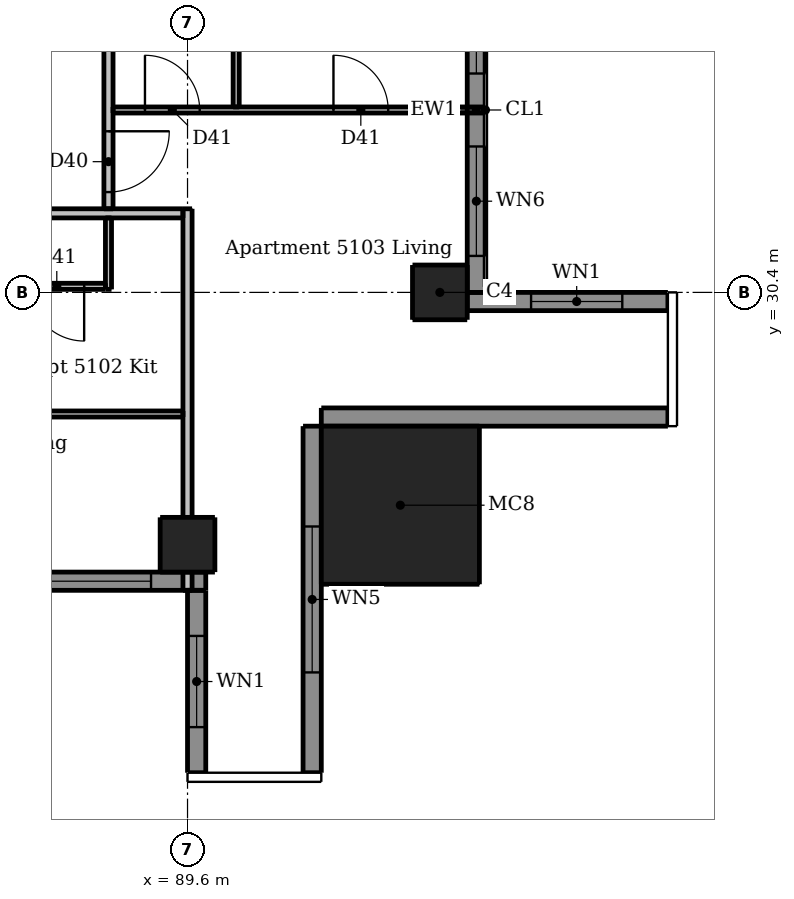
"""IFC4 building model, lengths in metres.
Left out: names, types, materials, properties, quantities, classifications, styles, units other than length and angle.
Written with IfcOpenShell. Run it as: python <this file> out.ifc"""

import sys

from ifc_helpers import new_model, si_unit, direction, frame, frame_2d, origin, origin_2d, place, context, subcontext, project, spatial, rectangle, extrude, element, fill, save


model = new_model("IFC4")
c1 = context("Model", 3, precision=1e-05, world=origin(), true_north=direction((0.0, 1.0)))
c2 = subcontext(c1, "Body", "Model", "MODEL_VIEW")
j1 = project(units=[si_unit("LENGTHUNIT", "METRE"), si_unit("PLANEANGLEUNIT", "RADIAN")], contexts=[c1])
p1 = place(None, origin())
s1 = spatial("IfcSite", under=j1, at=p1, CompositionType="ELEMENT")
p2 = place(p1, origin())
s2 = spatial("IfcBuilding", under=s1, at=p2, CompositionType="ELEMENT")
p3 = place(p2, frame((0.0, 0.0, 193.6)))
s3 = spatial("IfcBuildingStorey", under=s2, at=p3, CompositionType="ELEMENT", Elevation=193.6)
for number, where, z_axis, x_axis in (
    (1, (89.6, 26.25, 0.0), (0.0, 0.0, 1.0), (1.0, 0.0, 0.0)),
    (2, (93.75, 30.4, 0.0), (0.0, 0.0, 1.0), (1.0, 0.0, 0.0)),
):
    element("IfcColumn", number, at=place(p3, frame(where, z_axis=z_axis, x_axis=x_axis)), inside=s3, PredefinedType="COLUMN", context=c2, shape_type="SweptSolid", body=[
        extrude(rectangle(XDim=0.9, YDim=0.9, at=origin_2d()), origin(), (0.0, 0.0, 1.0), 3.05),
    ])
p4 = place(p3, frame((93.1, 26.9, 0.0), z_axis=(0.0, 0.0, 1.0), x_axis=(1.0, 0.0, 0.0)))
e3 = element("IfcColumn", 3, at=p4, inside=s3, PredefinedType="COLUMN", context=c2, shape_type="SweptSolid", body=[
    extrude(rectangle(XDim=2.6, YDim=2.6, at=origin_2d()), origin(), (0.0, 0.0, 1.0), 3.3),
])
p5 = place(p3, frame((89.75, 25.5, 0.0), z_axis=(0.0, 0.0, 1.0), x_axis=(0.0, -1.0, 0.0)))
e4 = element("IfcWall", 4, at=p5, inside=s3, PredefinedType="SOLIDWALL", context=c2, shape_type="SweptSolid", body=[
    extrude(rectangle(XDim=3.0, YDim=0.3, at=frame_2d((1.5, 0.0))), origin(), (0.0, 0.0, 1.0), 3.05),
])
p6 = place(p5, frame((0.75, 0.0, 0.9)))
e5 = element("IfcOpeningElement", 5, at=p6, cuts=e4, PredefinedType="OPENING", context=c2, shape_type="SweptSolid", body=[
    extrude(rectangle(XDim=1.5, YDim=1.5, at=frame_2d((0.75, 0.75))), frame((0.0, 0.16, 0.0), z_axis=(0.0, -1.0, 0.0), x_axis=(1.0, 0.0, 0.0)), (0.0, 0.0, 1.0), 0.32),
])
p7 = place(p3, frame((91.65, 22.5, 0.0), z_axis=(0.0, 0.0, 1.0), x_axis=(0.0, 1.0, 0.0)))
e6 = element("IfcWall", 6, at=p7, inside=s3, PredefinedType="SOLIDWALL", context=c2, shape_type="SweptSolid", body=[
    extrude(rectangle(XDim=5.7, YDim=0.3, at=frame_2d((2.85, 0.0))), origin(), (0.0, 0.0, 1.0), 3.05),
])
p8 = place(p7, frame((1.65, 0.0, 0.15)))
e7 = element("IfcOpeningElement", 7, at=p8, cuts=e6, PredefinedType="OPENING", context=c2, shape_type="SweptSolid", body=[
    extrude(rectangle(XDim=2.4, YDim=2.1, at=frame_2d((1.2, 1.05))), frame((0.0, 0.16, 0.0), z_axis=(0.0, -1.0, 0.0), x_axis=(1.0, 0.0, 0.0)), (0.0, 0.0, 1.0), 0.32),
])
p9 = place(p3, frame((91.8, 28.35, 0.0), z_axis=(0.0, 0.0, 1.0), x_axis=(1.0, 0.0, 0.0)))
e8 = element("IfcWall", 8, at=p9, inside=s3, PredefinedType="SOLIDWALL", context=c2, shape_type="SweptSolid", body=[
    extrude(rectangle(XDim=5.7, YDim=0.3, at=frame_2d((2.85, 0.0))), origin(), (0.0, 0.0, 1.0), 3.05),
])
p10 = place(p3, frame((97.5, 30.25, 0.0), z_axis=(0.0, 0.0, 1.0), x_axis=(-1.0, 0.0, 0.0)))
e9 = element("IfcWall", 9, at=p10, inside=s3, PredefinedType="SOLIDWALL", context=c2, shape_type="SweptSolid", body=[
    extrude(rectangle(XDim=3.3, YDim=0.3, at=frame_2d((1.65, 0.0))), origin(), (0.0, 0.0, 1.0), 3.05),
])
p11 = place(p10, frame((0.75, 0.0, 0.9)))
e10 = element("IfcOpeningElement", 10, at=p11, cuts=e9, PredefinedType="OPENING", context=c2, shape_type="SweptSolid", body=[
    extrude(rectangle(XDim=1.5, YDim=1.5, at=frame_2d((0.75, 0.75))), frame((0.0, 0.16, 0.0), z_axis=(0.0, -1.0, 0.0), x_axis=(1.0, 0.0, 0.0)), (0.0, 0.0, 1.0), 0.32),
])
p12 = place(p3, frame((83.6, 25.65, 0.0), z_axis=(0.0, 0.0, 1.0), x_axis=(1.0, 0.0, 0.0)))
e11 = element("IfcWall", 11, at=p12, inside=s3, PredefinedType="SOLIDWALL", context=c2, shape_type="SweptSolid", body=[
    extrude(rectangle(XDim=6.3, YDim=0.3, at=frame_2d((3.15, 0.0))), origin(), (0.0, 0.0, 1.0), 3.05),
])
p13 = place(p12, frame((0.6, 0.0, 0.15)))
e12 = element("IfcOpeningElement", 12, at=p13, cuts=e11, PredefinedType="OPENING", context=c2, shape_type="SweptSolid", body=[
    extrude(rectangle(XDim=1.8, YDim=2.1, at=frame_2d((0.9, 1.05))), frame((0.0, 0.16, 0.0), z_axis=(0.0, -1.0, 0.0), x_axis=(1.0, 0.0, 0.0)), (0.0, 0.0, 1.0), 0.32),
])
p14 = place(p12, frame((3.6, 0.0, 0.15)))
e13 = element("IfcOpeningElement", 13, at=p14, cuts=e11, PredefinedType="OPENING", context=c2, shape_type="SweptSolid", body=[
    extrude(rectangle(XDim=1.8, YDim=2.1, at=frame_2d((0.9, 1.05))), frame((0.0, 0.16, 0.0), z_axis=(0.0, -1.0, 0.0), x_axis=(1.0, 0.0, 0.0)), (0.0, 0.0, 1.0), 0.32),
])
p15 = place(p3, frame((94.35, 30.4, 0.0), z_axis=(0.0, 0.0, 1.0), x_axis=(0.0, 1.0, 0.0)))
e14 = element("IfcWall", 14, at=p15, inside=s3, PredefinedType="SOLIDWALL", context=c2, shape_type="SweptSolid", body=[
    extrude(rectangle(XDim=6.0, YDim=0.3, at=frame_2d((3.0, 0.0))), origin(), (0.0, 0.0, 1.0), 3.05),
])
p16 = place(p15, frame((0.6, 0.0, 0.15)))
e15 = element("IfcOpeningElement", 15, at=p16, cuts=e14, PredefinedType="OPENING", context=c2, shape_type="SweptSolid", body=[
    extrude(rectangle(XDim=1.8, YDim=2.1, at=frame_2d((0.9, 1.05))), frame((0.0, 0.16, 0.0), z_axis=(0.0, -1.0, 0.0), x_axis=(1.0, 0.0, 0.0)), (0.0, 0.0, 1.0), 0.32),
])
p17 = place(p15, frame((3.6, 0.0, 0.15)))
e16 = element("IfcOpeningElement", 16, at=p17, cuts=e14, PredefinedType="OPENING", context=c2, shape_type="SweptSolid", body=[
    extrude(rectangle(XDim=1.8, YDim=2.1, at=frame_2d((0.9, 1.05))), frame((0.0, 0.16, 0.0), z_axis=(0.0, -1.0, 0.0), x_axis=(1.0, 0.0, 0.0)), (0.0, 0.0, 1.0), 0.32),
])
p18 = place(p3, frame((88.3, 30.45, 0.0), z_axis=(0.0, 0.0, 1.0), x_axis=(0.0, 1.0, 0.0)))
e17 = element("IfcWall", 17, at=p18, inside=s3, PredefinedType="PARTITIONING", context=c2, shape_type="SweptSolid", body=[
    extrude(rectangle(XDim=1.175, YDim=0.1, at=frame_2d((0.587, 0.0))), origin(), (0.0, 0.0, 1.0), 3.05),
])
p19 = place(p3, frame((90.4, 33.45, 0.0), z_axis=(0.0, 0.0, 1.0), x_axis=(0.0, 1.0, 0.0)))
e18 = element("IfcWall", 18, at=p19, inside=s3, PredefinedType="PARTITIONING", context=c2, shape_type="SweptSolid", body=[
    extrude(rectangle(XDim=5.975, YDim=0.1, at=frame_2d((2.988, 0.0))), origin(), (0.0, 0.0, 1.0), 3.05),
])
p20 = place(p19, frame((3.8, 0.0, 0.0)))
e19 = element("IfcOpeningElement", 19, at=p20, cuts=e18, PredefinedType="OPENING", context=c2, shape_type="SweptSolid", body=[
    extrude(rectangle(XDim=0.8, YDim=2.1, at=frame_2d((0.4, 1.05))), frame((0.0, 0.06, 0.0), z_axis=(0.0, -1.0, 0.0), x_axis=(1.0, 0.0, 0.0)), (0.0, 0.0, 1.0), 0.12),
])
p21 = place(p3, frame((88.375, 33.4, 0.0), z_axis=(0.0, 0.0, 1.0), x_axis=(1.0, 0.0, 0.0)))
e20 = element("IfcWall", 20, at=p21, inside=s3, PredefinedType="PARTITIONING", context=c2, shape_type="SweptSolid", body=[
    extrude(rectangle(XDim=6.125, YDim=0.1, at=frame_2d((3.062, 0.0))), origin(), (0.0, 0.0, 1.0), 3.05),
])
p22 = place(p21, frame((0.525, 0.0, 0.0)))
e21 = element("IfcOpeningElement", 21, at=p22, cuts=e20, PredefinedType="OPENING", context=c2, shape_type="SweptSolid", body=[
    extrude(rectangle(XDim=0.9, YDim=2.1, at=frame_2d((0.45, 1.05))), frame((0.0, 0.06, 0.0), z_axis=(0.0, -1.0, 0.0), x_axis=(1.0, 0.0, 0.0)), (0.0, 0.0, 1.0), 0.12),
])
p23 = place(p21, frame((3.625, 0.0, 0.0)))
e22 = element("IfcOpeningElement", 22, at=p23, cuts=e20, PredefinedType="OPENING", context=c2, shape_type="SweptSolid", body=[
    extrude(rectangle(XDim=0.9, YDim=2.1, at=frame_2d((0.45, 1.05))), frame((0.0, 0.06, 0.0), z_axis=(0.0, -1.0, 0.0), x_axis=(1.0, 0.0, 0.0)), (0.0, 0.0, 1.0), 0.12),
])
p24 = place(p3, frame((88.25, 30.5, 0.0), z_axis=(0.0, 0.0, 1.0), x_axis=(-1.0, 0.0, 0.0)))
e23 = element("IfcWall", 23, at=p24, inside=s3, PredefinedType="PARTITIONING", context=c2, shape_type="SweptSolid", body=[
    extrude(rectangle(XDim=16.575, YDim=0.1, at=frame_2d((8.288, 0.0))), origin(), (0.0, 0.0, 1.0), 3.05),
])
p25 = place(p24, frame((4.15, 0.0, 0.0)))
e24 = element("IfcOpeningElement", 24, at=p25, cuts=e23, PredefinedType="OPENING", context=c2, shape_type="SweptSolid", body=[
    extrude(rectangle(XDim=0.9, YDim=2.1, at=frame_2d((0.45, 1.05))), frame((0.0, 0.06, 0.0), z_axis=(0.0, -1.0, 0.0), x_axis=(1.0, 0.0, 0.0)), (0.0, 0.0, 1.0), 0.12),
])
p26 = place(p24, frame((0.35, 0.0, 0.0)))
e25 = element("IfcOpeningElement", 25, at=p26, cuts=e23, PredefinedType="OPENING", context=c2, shape_type="SweptSolid", body=[
    extrude(rectangle(XDim=0.9, YDim=2.1, at=frame_2d((0.45, 1.05))), frame((0.0, 0.06, 0.0), z_axis=(0.0, -1.0, 0.0), x_axis=(1.0, 0.0, 0.0)), (0.0, 0.0, 1.0), 0.12),
])
p27 = place(p24, frame((14.4, 0.0, 0.0)))
e26 = element("IfcOpeningElement", 26, at=p27, cuts=e23, PredefinedType="OPENING", context=c2, shape_type="SweptSolid", body=[
    extrude(rectangle(XDim=0.9, YDim=2.1, at=frame_2d((0.45, 1.05))), frame((0.0, 0.06, 0.0), z_axis=(0.0, -1.0, 0.0), x_axis=(1.0, 0.0, 0.0)), (0.0, 0.0, 1.0), 0.12),
])
p28 = place(p24, frame((8.65, 0.0, 0.0)))
e27 = element("IfcOpeningElement", 27, at=p28, cuts=e23, PredefinedType="OPENING", context=c2, shape_type="SweptSolid", body=[
    extrude(rectangle(XDim=0.9, YDim=2.1, at=frame_2d((0.45, 1.05))), frame((0.0, 0.06, 0.0), z_axis=(0.0, -1.0, 0.0), x_axis=(1.0, 0.0, 0.0)), (0.0, 0.0, 1.0), 0.12),
])
p29 = place(p24, frame((11.45, 0.0, 0.0)))
e28 = element("IfcOpeningElement", 28, at=p29, cuts=e23, PredefinedType="OPENING", context=c2, shape_type="SweptSolid", body=[
    extrude(rectangle(XDim=0.8, YDim=2.1, at=frame_2d((0.4, 1.05))), frame((0.0, 0.06, 0.0), z_axis=(0.0, -1.0, 0.0), x_axis=(1.0, 0.0, 0.0)), (0.0, 0.0, 1.0), 0.12),
])
p30 = place(p3, frame((86.65, 28.4, 0.0), z_axis=(0.0, 0.0, 1.0), x_axis=(1.0, 0.0, 0.0)))
e29 = element("IfcWall", 29, at=p30, inside=s3, PredefinedType="PARTITIONING", context=c2, shape_type="SweptSolid", body=[
    extrude(rectangle(XDim=2.875, YDim=0.1, at=frame_2d((1.438, 0.0))), origin(), (0.0, 0.0, 1.0), 3.05),
])
p31 = place(p3, frame((88.3, 61.175, 0.0), z_axis=(0.0, 0.0, 1.0), x_axis=(0.0, -1.0, 0.0)))
e30 = element("IfcWall", 30, at=p31, inside=s3, PredefinedType="PARTITIONING", context=c2, shape_type="SweptSolid", body=[
    extrude(rectangle(XDim=29.4, YDim=0.15, at=frame_2d((14.7, 0.0))), origin(), (0.0, 0.0, 1.0), 3.05),
])
p32 = place(p31, frame((28.125, 0.0, 0.0)))
e31 = element("IfcOpeningElement", 31, at=p32, cuts=e30, PredefinedType="OPENING", context=c2, shape_type="SweptSolid", body=[
    extrude(rectangle(XDim=1.0, YDim=2.1, at=frame_2d((0.5, 1.05))), frame((0.0, 0.085, 0.0), z_axis=(0.0, -1.0, 0.0), x_axis=(1.0, 0.0, 0.0)), (0.0, 0.0, 1.0), 0.17),
])
p33 = place(p31, frame((10.725, 0.0, 0.0)))
e32 = element("IfcOpeningElement", 32, at=p33, cuts=e30, PredefinedType="OPENING", context=c2, shape_type="SweptSolid", body=[
    extrude(rectangle(XDim=1.0, YDim=2.1, at=frame_2d((0.5, 1.05))), frame((0.0, 0.085, 0.0), z_axis=(0.0, -1.0, 0.0), x_axis=(1.0, 0.0, 0.0)), (0.0, 0.0, 1.0), 0.17),
])
p34 = place(p3, frame((89.6, 25.5, 0.0), z_axis=(0.0, 0.0, 1.0), x_axis=(0.0, 1.0, 0.0)))
e33 = element("IfcWall", 33, at=p34, inside=s3, PredefinedType="PARTITIONING", context=c2, shape_type="SweptSolid", body=[
    extrude(rectangle(XDim=6.275, YDim=0.15, at=frame_2d((3.137, 0.0))), origin(), (0.0, 0.0, 1.0), 2.516),
])
p35 = place(p3, frame((89.525, 31.7, 0.0), z_axis=(0.0, 0.0, 1.0), x_axis=(-1.0, 0.0, 0.0)))
e34 = element("IfcWall", 34, at=p35, inside=s3, PredefinedType="PARTITIONING", context=c2, shape_type="SweptSolid", body=[
    extrude(rectangle(XDim=30.55, YDim=0.15, at=frame_2d((15.275, 0.0))), origin(), (0.0, 0.0, 1.0), 3.05),
])
p36 = place(p35, frame((26.775, 0.0, 0.0)))
e35 = element("IfcOpeningElement", 35, at=p36, cuts=e34, PredefinedType="OPENING", context=c2, shape_type="SweptSolid", body=[
    extrude(rectangle(XDim=1.0, YDim=2.1, at=frame_2d((0.5, 1.05))), frame((0.0, 0.085, 0.0), z_axis=(0.0, -1.0, 0.0), x_axis=(1.0, 0.0, 0.0)), (0.0, 0.0, 1.0), 0.17),
])
p37 = place(p35, frame((9.075, 0.0, 0.0)))
e36 = element("IfcOpeningElement", 36, at=p37, cuts=e34, PredefinedType="OPENING", context=c2, shape_type="SweptSolid", body=[
    extrude(rectangle(XDim=1.0, YDim=2.1, at=frame_2d((0.5, 1.05))), frame((0.0, 0.085, 0.0), z_axis=(0.0, -1.0, 0.0), x_axis=(1.0, 0.0, 0.0)), (0.0, 0.0, 1.0), 0.17),
])
p38 = place(p6, origin())
e37 = element("IfcWindow", 37, at=p38, inside=s3, PartitioningType="DOUBLE_PANEL_VERTICAL", PredefinedType="WINDOW", context=c2, shape_type="SweptSolid", body=[
    extrude(rectangle(XDim=1.5, YDim=1.5, at=frame_2d((0.75, 0.75))), frame((0.0, 0.03, 0.0), z_axis=(0.0, -1.0, 0.0), x_axis=(1.0, 0.0, 0.0)), (0.0, 0.0, 1.0), 0.06),
])
fill(e5, e37)
p39 = place(p8, origin())
e38 = element("IfcWindow", 38, at=p39, inside=s3, PartitioningType="DOUBLE_PANEL_VERTICAL", PredefinedType="WINDOW", context=c2, shape_type="SweptSolid", body=[
    extrude(rectangle(XDim=2.4, YDim=2.1, at=frame_2d((1.2, 1.05))), frame((0.0, 0.03, 0.0), z_axis=(0.0, -1.0, 0.0), x_axis=(1.0, 0.0, 0.0)), (0.0, 0.0, 1.0), 0.06),
])
fill(e7, e38)
p40 = place(p11, origin())
e39 = element("IfcWindow", 39, at=p40, inside=s3, PartitioningType="DOUBLE_PANEL_VERTICAL", PredefinedType="WINDOW", context=c2, shape_type="SweptSolid", body=[
    extrude(rectangle(XDim=1.5, YDim=1.5, at=frame_2d((0.75, 0.75))), frame((0.0, 0.03, 0.0), z_axis=(0.0, -1.0, 0.0), x_axis=(1.0, 0.0, 0.0)), (0.0, 0.0, 1.0), 0.06),
])
fill(e10, e39)
p41 = place(p14, origin())
e40 = element("IfcWindow", 40, at=p41, inside=s3, PartitioningType="DOUBLE_PANEL_VERTICAL", PredefinedType="WINDOW", context=c2, shape_type="SweptSolid", body=[
    extrude(rectangle(XDim=1.8, YDim=2.1, at=frame_2d((0.9, 1.05))), frame((0.0, 0.03, 0.0), z_axis=(0.0, -1.0, 0.0), x_axis=(1.0, 0.0, 0.0)), (0.0, 0.0, 1.0), 0.06),
])
fill(e13, e40)
p42 = place(p16, origin())
e41 = element("IfcWindow", 41, at=p42, inside=s3, PartitioningType="DOUBLE_PANEL_VERTICAL", PredefinedType="WINDOW", context=c2, shape_type="SweptSolid", body=[
    extrude(rectangle(XDim=1.8, YDim=2.1, at=frame_2d((0.9, 1.05))), frame((0.0, 0.03, 0.0), z_axis=(0.0, -1.0, 0.0), x_axis=(1.0, 0.0, 0.0)), (0.0, 0.0, 1.0), 0.06),
])
fill(e15, e41)
p43 = place(p17, origin())
e42 = element("IfcWindow", 42, at=p43, inside=s3, PartitioningType="DOUBLE_PANEL_VERTICAL", PredefinedType="WINDOW", context=c2, shape_type="SweptSolid", body=[
    extrude(rectangle(XDim=1.8, YDim=2.1, at=frame_2d((0.9, 1.05))), frame((0.0, 0.03, 0.0), z_axis=(0.0, -1.0, 0.0), x_axis=(1.0, 0.0, 0.0)), (0.0, 0.0, 1.0), 0.06),
])
fill(e16, e42)
p44 = place(p26, origin())
e43 = element("IfcDoor", 43, at=p44, inside=s3, OperationType="SINGLE_SWING_LEFT", PredefinedType="DOOR", context=c2, shape_type="SweptSolid", body=[
    extrude(rectangle(XDim=0.9, YDim=2.1, at=frame_2d((0.45, 1.05))), frame((0.0, 0.025, 0.0), z_axis=(0.0, -1.0, 0.0), x_axis=(1.0, 0.0, 0.0)), (0.0, 0.0, 1.0), 0.05),
])
fill(e25, e43)
p45 = place(p32, origin())
e44 = element("IfcDoor", 44, at=p45, inside=s3, OperationType="SINGLE_SWING_LEFT", PredefinedType="DOOR", context=c2, shape_type="SweptSolid", body=[
    extrude(rectangle(XDim=1.0, YDim=2.1, at=frame_2d((0.5, 1.05))), frame((0.0, 0.025, 0.0), z_axis=(0.0, -1.0, 0.0), x_axis=(1.0, 0.0, 0.0)), (0.0, 0.0, 1.0), 0.05),
])
fill(e31, e44)
p46 = place(p22, origin())
e45 = element("IfcDoor", 45, at=p46, inside=s3, OperationType="SINGLE_SWING_LEFT", PredefinedType="DOOR", context=c2, shape_type="SweptSolid", body=[
    extrude(rectangle(XDim=0.9, YDim=2.1, at=frame_2d((0.45, 1.05))), frame((0.0, 0.025, 0.0), z_axis=(0.0, -1.0, 0.0), x_axis=(1.0, 0.0, 0.0)), (0.0, 0.0, 1.0), 0.05),
])
fill(e21, e45)
p47 = place(p23, origin())
e46 = element("IfcDoor", 46, at=p47, inside=s3, OperationType="SINGLE_SWING_LEFT", PredefinedType="DOOR", context=c2, shape_type="SweptSolid", body=[
    extrude(rectangle(XDim=0.9, YDim=2.1, at=frame_2d((0.45, 1.05))), frame((0.0, 0.025, 0.0), z_axis=(0.0, -1.0, 0.0), x_axis=(1.0, 0.0, 0.0)), (0.0, 0.0, 1.0), 0.05),
])
fill(e22, e46)
save(model, sys.argv[1])
